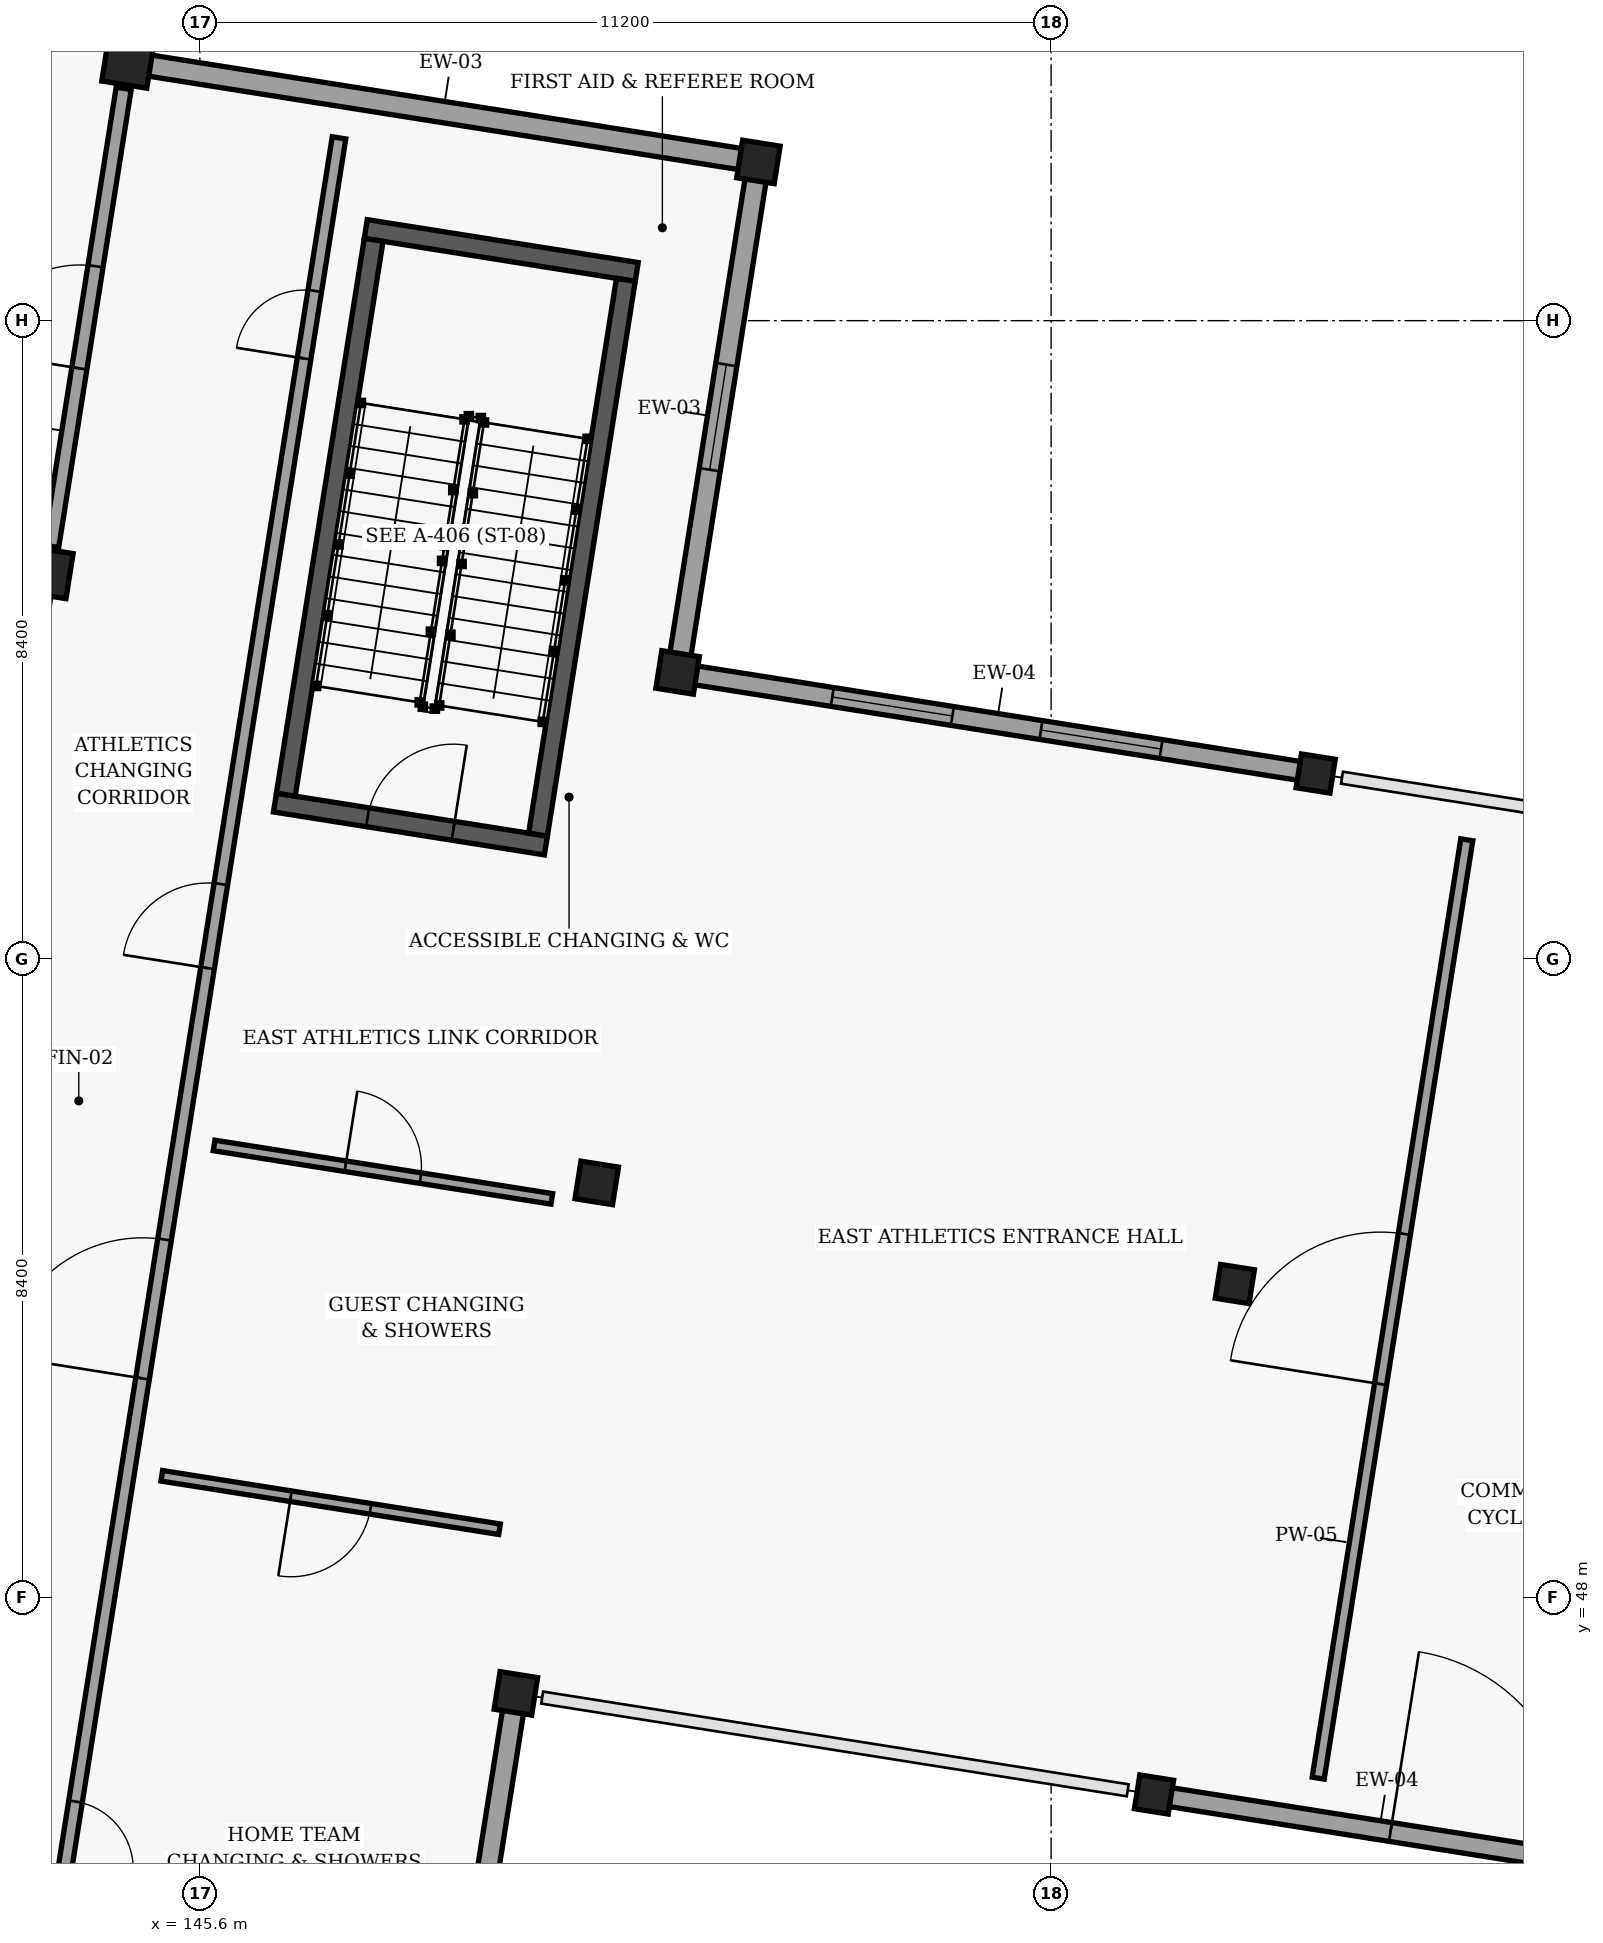
"""IFC4 building model, lengths in metres.
Left out: names, types, materials, properties, quantities, classifications, styles, units other than length and angle.
Written with IfcOpenShell. Run it as: python <this file> out.ifc"""

import sys

from ifc_helpers import new_model, si_unit, direction, frame, frame_2d, origin, origin_2d, place, context, subcontext, project, spatial, rectangle, circle, extrude, element, fill, save


model = new_model("IFC4")
c1 = context("Model", 3, precision=1e-05, world=origin(), true_north=direction((0.0, 1.0)))
c2 = subcontext(c1, "Body", "Model", "MODEL_VIEW")
j1 = project(units=[si_unit("LENGTHUNIT", "METRE"), si_unit("PLANEANGLEUNIT", "RADIAN")], contexts=[c1])
p1 = place(None, origin())
s1 = spatial("IfcSite", under=j1, at=p1, CompositionType="ELEMENT")
p2 = place(p1, origin())
s2 = spatial("IfcBuilding", under=s1, at=p2, CompositionType="ELEMENT")
p3 = place(p2, origin())
s3 = spatial("IfcBuildingStorey", under=s2, at=p3, CompositionType="ELEMENT", Elevation=0.0)
for number, where, z_axis, x_axis in (
    (1, (143.589, 61.486, 0.0), (0.0, 0.0, 1.0), (0.988, -0.156, 0.0)),
    (2, (144.653, 68.202, 0.0), (0.0, 0.0, 1.0), (0.988, -0.156, 0.0)),
):
    element("IfcColumn", number, at=place(p3, frame(where, z_axis=z_axis, x_axis=x_axis)), inside=s3, PredefinedType="COLUMN", context=c2, shape_type="SweptSolid", body=[
        extrude(rectangle(XDim=0.6, YDim=0.6, at=origin_2d()), origin(), (0.0, 0.0, 1.0), 4.8),
    ])
for number, where, z_axis, x_axis in (
    (3, (149.758, 46.74, 0.0), (0.0, 0.0, 1.0), (0.988, -0.156, 0.0)),
    (4, (150.822, 53.456, 0.0), (0.0, 0.0, 1.0), (0.988, -0.156, 0.0)),
    (5, (151.886, 60.172, 0.0), (0.0, 0.0, 1.0), (0.988, -0.156, 0.0)),
    (6, (152.949, 66.888, 0.0), (0.0, 0.0, 1.0), (0.988, -0.156, 0.0)),
):
    element("IfcColumn", number, at=place(p3, frame(where, z_axis=z_axis, x_axis=x_axis)), inside=s3, PredefinedType="COLUMN", context=c2, shape_type="SweptSolid", body=[
        extrude(rectangle(XDim=0.5, YDim=0.5, at=origin_2d()), origin(), (0.0, 0.0, 1.0), 4.8),
    ])
for number, where, z_axis, x_axis in (
    (7, (158.154, 45.41, 0.0), (0.0, 0.0, 1.0), (0.988, -0.156, 0.0)),
    (8, (159.217, 52.126, 0.0), (0.0, 0.0, 1.0), (0.988, -0.156, 0.0)),
    (9, (160.281, 58.842, 0.0), (0.0, 0.0, 1.0), (0.988, -0.156, 0.0)),
):
    element("IfcColumn", number, at=place(p3, frame(where, z_axis=z_axis, x_axis=x_axis)), inside=s3, PredefinedType="PILASTER", context=c2, shape_type="SweptSolid", body=[
        extrude(circle(Radius=0.225, at=origin_2d()), origin(), (0.0, 0.0, 1.0), 4.8),
    ])
p4 = place(p3, frame((148.71, 40.122, 0.0), z_axis=(0.0, 0.0, 1.0), x_axis=(0.156500089252, 0.987677944506, 0.0)))
e10 = element("IfcWall", 10, at=p4, inside=s3, PredefinedType="SOLIDWALL", context=c2, shape_type="SweptSolid", body=[
    extrude(rectangle(XDim=6.6, YDim=0.28, at=frame_2d((3.3, 0.0))), origin(), (0.0, 0.0, 1.0), 3.928),
])
p5 = place(p4, frame((2.6, 0.0, 1.35)))
e11 = element("IfcOpeningElement", 11, at=p5, cuts=e10, PredefinedType="OPENING", context=c2, shape_type="SweptSolid", body=[
    extrude(rectangle(XDim=1.4, YDim=1.2, at=frame_2d((0.7, 0.6))), frame((0.0, 0.15, 0.0), z_axis=(0.0, -1.0, 0.0), x_axis=(1.0, 0.0, 0.0)), (0.0, 0.0, 1.0), 0.3),
])
p6 = place(p3, frame((151.901, 60.271, 0.0), z_axis=(0.0, 0.0, 1.0), x_axis=(0.156536171909, 0.987672226442, 0.0)))
e12 = element("IfcWall", 12, at=p6, inside=s3, PredefinedType="SOLIDWALL", context=c2, shape_type="SweptSolid", body=[
    extrude(rectangle(XDim=6.6, YDim=0.28, at=frame_2d((3.3, 0.0))), origin(), (0.0, 0.0, 1.0), 3.928),
])
p7 = place(p6, frame((2.6, 0.0, 1.35)))
e13 = element("IfcOpeningElement", 13, at=p7, cuts=e12, PredefinedType="OPENING", context=c2, shape_type="SweptSolid", body=[
    extrude(rectangle(XDim=1.4, YDim=1.2, at=frame_2d((0.7, 0.6))), frame((0.0, 0.15, 0.0), z_axis=(0.0, -1.0, 0.0), x_axis=(1.0, 0.0, 0.0)), (0.0, 0.0, 1.0), 0.3),
])
p8 = place(p3, frame((144.732, 68.189, 0.0), z_axis=(0.0, 0.0, 1.0), x_axis=(0.987704756752, -0.156330782283, 0.0)))
e14 = element("IfcWall", 14, at=p8, inside=s3, PredefinedType="SOLIDWALL", context=c2, shape_type="SweptSolid", body=[
    extrude(rectangle(XDim=8.24, YDim=0.28, at=frame_2d((4.12, 0.0))), origin(), (0.0, 0.0, 1.0), 4.006),
])
p9 = place(p3, frame((144.666, 68.281, 0.0), z_axis=(0.0, 0.0, 1.0), x_axis=(0.15632126228, 0.987706263501, 0.0)))
e15 = element("IfcWall", 15, at=p9, inside=s3, PredefinedType="SOLIDWALL", context=c2, shape_type="SweptSolid", body=[
    extrude(rectangle(XDim=6.641, YDim=0.28, at=frame_2d((3.32, 0.0))), origin(), (0.0, 0.0, 1.0), 4.135),
])
p10 = place(p3, frame((158.233, 45.397, 0.0), z_axis=(0.0, 0.0, 1.0), x_axis=(0.987701196417, -0.156353274977, 0.0)))
e16 = element("IfcWall", 16, at=p10, inside=s3, PredefinedType="SOLIDWALL", context=c2, shape_type="SweptSolid", body=[
    extrude(rectangle(XDim=5.84, YDim=0.25, at=frame_2d((2.92, 0.0))), origin(), (0.0, 0.0, 1.0), 4.375),
])
p11 = place(p10, frame((3.07, 0.0, 0.0)))
e17 = element("IfcOpeningElement", 17, at=p11, cuts=e16, PredefinedType="OPENING", context=c2, shape_type="SweptSolid", body=[
    extrude(rectangle(XDim=2.4, YDim=2.4, at=frame_2d((1.2, 1.2))), frame((0.0, 0.135, 0.0), z_axis=(0.0, -1.0, 0.0), x_axis=(1.0, 0.0, 0.0)), (0.0, 0.0, 1.0), 0.27),
])
p12 = place(p3, frame((151.965, 60.159, 0.0), z_axis=(0.0, 0.0, 1.0), x_axis=(0.987699982026, -0.156360946233, 0.0)))
e18 = element("IfcWall", 18, at=p12, inside=s3, PredefinedType="SOLIDWALL", context=c2, shape_type="SweptSolid", body=[
    extrude(rectangle(XDim=8.339, YDim=0.25, at=frame_2d((4.17, 0.0))), origin(), (0.0, 0.0, 1.0), 4.375),
])
p13 = place(p12, frame((1.98, 0.0, 0.9)))
e19 = element("IfcOpeningElement", 19, at=p13, cuts=e18, PredefinedType="OPENING", context=c2, shape_type="SweptSolid", body=[
    extrude(rectangle(XDim=1.6, YDim=2.1, at=frame_2d((0.8, 1.05))), frame((0.0, 0.135, 0.0), z_axis=(0.0, -1.0, 0.0), x_axis=(1.0, 0.0, 0.0)), (0.0, 0.0, 1.0), 0.27),
])
p14 = place(p12, frame((4.76, 0.0, 0.9)))
e20 = element("IfcOpeningElement", 20, at=p14, cuts=e18, PredefinedType="OPENING", context=c2, shape_type="SweptSolid", body=[
    extrude(rectangle(XDim=1.6, YDim=2.1, at=frame_2d((0.8, 1.05))), frame((0.0, 0.135, 0.0), z_axis=(0.0, -1.0, 0.0), x_axis=(1.0, 0.0, 0.0)), (0.0, 0.0, 1.0), 0.27),
])
p15 = place(p3, frame((150.153, 57.895, 0.0), z_axis=(0.0, 0.0, 1.0), x_axis=(-0.987676717047, 0.156507835599, 0.0)))
e21 = element("IfcWall", 21, at=p15, inside=s3, PredefinedType="SHEAR", context=c2, shape_type="SweptSolid", body=[
    extrude(rectangle(XDim=3.61, YDim=0.25, at=frame_2d((1.805, 0.0))), origin(), (0.0, 0.0, 1.0), 4.56),
])
p16 = place(p15, frame((1.235, 0.0, 0.0)))
e22 = element("IfcOpeningElement", 22, at=p16, cuts=e21, PredefinedType="OPENING", context=c2, shape_type="SweptSolid", body=[
    extrude(rectangle(XDim=1.14, YDim=2.15, at=frame_2d((0.57, 1.075))), frame((0.0, 0.135, 0.0), z_axis=(0.0, -1.0, 0.0), x_axis=(1.0, 0.0, 0.0)), (0.0, 0.0, 1.0), 0.27),
])
p17 = place(p3, frame((147.783, 66.006, 0.0), z_axis=(0.0, 0.0, 1.0), x_axis=(0.987664601714, -0.156584272906, 0.0)))
e23 = element("IfcWall", 23, at=p17, inside=s3, PredefinedType="SHEAR", context=c2, shape_type="SweptSolid", body=[
    extrude(rectangle(XDim=3.609, YDim=0.25, at=frame_2d((1.805, 0.0))), origin(), (0.0, 0.0, 1.0), 4.56),
])
p18 = place(p3, frame((146.731, 58.564, 0.0), z_axis=(0.0, 0.0, 1.0), x_axis=(0.15642738738, 0.98768946156, 0.0)))
e24 = element("IfcWall", 24, at=p18, inside=s3, PredefinedType="SHEAR", context=c2, shape_type="SweptSolid", body=[
    extrude(rectangle(XDim=7.39, YDim=0.25, at=frame_2d((3.695, 0.0))), origin(), (0.0, 0.0, 1.0), 4.56),
])
p19 = place(p3, frame((151.205, 65.337, 0.0), z_axis=(0.0, 0.0, 1.0), x_axis=(-0.156432491725, -0.987688653136, 0.0)))
e25 = element("IfcWall", 25, at=p19, inside=s3, PredefinedType="SHEAR", context=c2, shape_type="SweptSolid", body=[
    extrude(rectangle(XDim=7.39, YDim=0.25, at=frame_2d((3.695, 0.0))), origin(), (0.0, 0.0, 1.0), 4.56),
])
p20 = place(p3, frame((143.644, 61.832, 0.0), z_axis=(0.0, 0.0, 1.0), x_axis=(0.156396286335, 0.987694386752, 0.0)))
e26 = element("IfcWall", 26, at=p20, inside=s3, PredefinedType="PARTITIONING", context=c2, shape_type="SweptSolid", body=[
    extrude(rectangle(XDim=6.099, YDim=0.2, at=frame_2d((3.049, 0.0))), origin(), (0.0, 0.0, 1.0), 3.928),
])
p21 = place(p20, frame((2.37, 0.0, 0.0)))
e27 = element("IfcOpeningElement", 27, at=p21, cuts=e26, PredefinedType="OPENING", context=c2, shape_type="SweptSolid", body=[
    extrude(rectangle(XDim=1.36, YDim=2.22, at=frame_2d((0.68, 1.11))), frame((0.0, 0.11, 0.0), z_axis=(0.0, -1.0, 0.0), x_axis=(1.0, 0.0, 0.0)), (0.0, 0.0, 1.0), 0.22),
])
p22 = place(p3, frame((160.314, 45.625, 0.0), z_axis=(0.0, 0.0, 1.0), x_axis=(0.156420950688, 0.987690480963, 0.0)))
e28 = element("IfcWall", 28, at=p22, inside=s3, PredefinedType="PARTITIONING", context=c2, shape_type="SweptSolid", body=[
    extrude(rectangle(XDim=12.499, YDim=0.16, at=frame_2d((6.25, 0.0))), origin(), (0.0, 0.0, 1.0), 4.545),
])
p23 = place(p22, frame((5.249, 0.0, 0.0)))
e29 = element("IfcOpeningElement", 29, at=p23, cuts=e28, PredefinedType="OPENING", context=c2, shape_type="SweptSolid", body=[
    extrude(rectangle(XDim=2.0, YDim=2.3, at=frame_2d((1.0, 1.15))), frame((0.0, 0.09, 0.0), z_axis=(0.0, -1.0, 0.0), x_axis=(1.0, 0.0, 0.0)), (0.0, 0.0, 1.0), 0.18),
])
p24 = place(p3, frame((143.348, 41.427, 0.0), z_axis=(0.0, 0.0, 1.0), x_axis=(0.156440506918, 0.987687383637, 0.0)))
e30 = element("IfcWall", 30, at=p24, inside=s3, PredefinedType="PARTITIONING", context=c2, shape_type="SweptSolid", body=[
    extrude(rectangle(XDim=26.099, YDim=0.18, at=frame_2d((13.05, 0.0))), origin(), (0.0, 0.0, 1.0), 4.006),
])
p25 = place(p24, frame((9.575, 0.0, 0.0)))
e31 = element("IfcOpeningElement", 31, at=p25, cuts=e30, PredefinedType="OPENING", context=c2, shape_type="SweptSolid", body=[
    extrude(rectangle(XDim=1.85, YDim=2.22, at=frame_2d((0.925, 1.11))), frame((0.0, 0.1, 0.0), z_axis=(0.0, -1.0, 0.0), x_axis=(1.0, 0.0, 0.0)), (0.0, 0.0, 1.0), 0.2),
])
p26 = place(p24, frame((15.04, 0.0, 0.0)))
e32 = element("IfcOpeningElement", 32, at=p26, cuts=e30, PredefinedType="OPENING", context=c2, shape_type="SweptSolid", body=[
    extrude(rectangle(XDim=1.12, YDim=2.16, at=frame_2d((0.56, 1.08))), frame((0.0, 0.1, 0.0), z_axis=(0.0, -1.0, 0.0), x_axis=(1.0, 0.0, 0.0)), (0.0, 0.0, 1.0), 0.2),
])
p27 = place(p24, frame((3.039, 0.0, 0.0)))
e33 = element("IfcOpeningElement", 33, at=p27, cuts=e30, PredefinedType="OPENING", context=c2, shape_type="SweptSolid", body=[
    extrude(rectangle(XDim=0.9, YDim=2.06, at=frame_2d((0.45, 1.03))), frame((0.0, 0.1, 0.0), z_axis=(0.0, -1.0, 0.0), x_axis=(1.0, 0.0, 0.0)), (0.0, 0.0, 1.0), 0.2),
])
p28 = place(p24, frame((23.161, 0.0, 0.0)))
e34 = element("IfcOpeningElement", 34, at=p28, cuts=e30, PredefinedType="OPENING", context=c2, shape_type="SweptSolid", body=[
    extrude(rectangle(XDim=0.9, YDim=2.06, at=frame_2d((0.45, 1.03))), frame((0.0, 0.1, 0.0), z_axis=(0.0, -1.0, 0.0), x_axis=(1.0, 0.0, 0.0)), (0.0, 0.0, 1.0), 0.2),
])
p29 = place(p3, frame((145.099, 49.603, 0.0), z_axis=(0.0, 0.0, 1.0), x_axis=(0.987712756743, -0.156280229613, 0.0)))
e35 = element("IfcWall", 35, at=p29, inside=s3, PredefinedType="PARTITIONING", context=c2, shape_type="SweptSolid", body=[
    extrude(rectangle(XDim=4.499, YDim=0.14, at=frame_2d((2.25, 0.0))), origin(), (0.0, 0.0, 1.0), 4.135),
])
p30 = place(p29, frame((1.72, 0.0, 0.0)))
e36 = element("IfcOpeningElement", 36, at=p30, cuts=e35, PredefinedType="OPENING", context=c2, shape_type="SweptSolid", body=[
    extrude(rectangle(XDim=1.06, YDim=2.16, at=frame_2d((0.53, 1.08))), frame((0.0, 0.08, 0.0), z_axis=(0.0, -1.0, 0.0), x_axis=(1.0, 0.0, 0.0)), (0.0, 0.0, 1.0), 0.16),
])
p31 = place(p3, frame((145.787, 53.949, 0.0), z_axis=(0.0, 0.0, 1.0), x_axis=(0.98772113158, -0.156227290288, 0.0)))
e37 = element("IfcWall", 37, at=p31, inside=s3, PredefinedType="PARTITIONING", context=c2, shape_type="SweptSolid", body=[
    extrude(rectangle(XDim=4.499, YDim=0.14, at=frame_2d((2.25, 0.0))), origin(), (0.0, 0.0, 1.0), 4.135),
])
p32 = place(p31, frame((1.75, 0.0, 0.0)))
e38 = element("IfcOpeningElement", 38, at=p32, cuts=e37, PredefinedType="OPENING", context=c2, shape_type="SweptSolid", body=[
    extrude(rectangle(XDim=1.0, YDim=2.14, at=frame_2d((0.5, 1.07))), frame((0.0, 0.08, 0.0), z_axis=(0.0, -1.0, 0.0), x_axis=(1.0, 0.0, 0.0)), (0.0, 0.0, 1.0), 0.16),
])
p33 = place(p7, origin())
e39 = element("IfcWindow", 39, at=p33, inside=s3, PartitioningType="SINGLE_PANEL", PredefinedType="WINDOW", context=c2, shape_type="SweptSolid", body=[
    extrude(rectangle(XDim=1.4, YDim=1.2, at=frame_2d((0.7, 0.6))), frame((0.0, 0.03, 0.0), z_axis=(0.0, -1.0, 0.0), x_axis=(1.0, 0.0, 0.0)), (0.0, 0.0, 1.0), 0.06),
])
fill(e13, e39)
p34 = place(p13, origin())
e40 = element("IfcWindow", 40, at=p34, inside=s3, PartitioningType="SINGLE_PANEL", PredefinedType="WINDOW", context=c2, shape_type="SweptSolid", body=[
    extrude(rectangle(XDim=1.6, YDim=2.1, at=frame_2d((0.8, 1.05))), frame((0.0, 0.03, 0.0), z_axis=(0.0, -1.0, 0.0), x_axis=(1.0, 0.0, 0.0)), (0.0, 0.0, 1.0), 0.06),
])
fill(e19, e40)
p35 = place(p14, origin())
e41 = element("IfcWindow", 41, at=p35, inside=s3, PartitioningType="SINGLE_PANEL", PredefinedType="WINDOW", context=c2, shape_type="SweptSolid", body=[
    extrude(rectangle(XDim=1.6, YDim=2.1, at=frame_2d((0.8, 1.05))), frame((0.0, 0.03, 0.0), z_axis=(0.0, -1.0, 0.0), x_axis=(1.0, 0.0, 0.0)), (0.0, 0.0, 1.0), 0.06),
])
fill(e20, e41)
p36 = place(p16, origin())
e42 = element("IfcDoor", 42, at=p36, inside=s3, OperationType="SINGLE_SWING_RIGHT", PredefinedType="DOOR", context=c2, shape_type="SweptSolid", body=[
    extrude(rectangle(XDim=1.14, YDim=2.15, at=frame_2d((0.57, 1.075))), frame((0.0, 0.025, 0.0), z_axis=(0.0, -1.0, 0.0), x_axis=(1.0, 0.0, 0.0)), (0.0, 0.0, 1.0), 0.05),
])
fill(e22, e42)
p37 = place(p11, origin())
e43 = element("IfcDoor", 43, at=p37, inside=s3, OperationType="DOUBLE_DOOR_SINGLE_SWING", PredefinedType="DOOR", context=c2, shape_type="SweptSolid", body=[
    extrude(rectangle(XDim=2.4, YDim=2.4, at=frame_2d((1.2, 1.2))), frame((0.0, 0.025, 0.0), z_axis=(0.0, -1.0, 0.0), x_axis=(1.0, 0.0, 0.0)), (0.0, 0.0, 1.0), 0.05),
])
fill(e17, e43)
p38 = place(p21, origin())
e44 = element("IfcDoor", 44, at=p38, inside=s3, OperationType="DOUBLE_DOOR_SINGLE_SWING", PredefinedType="DOOR", context=c2, shape_type="SweptSolid", body=[
    extrude(rectangle(XDim=1.36, YDim=2.22, at=frame_2d((0.68, 1.11))), frame((0.0, 0.025, 0.0), z_axis=(0.0, -1.0, 0.0), x_axis=(1.0, 0.0, 0.0)), (0.0, 0.0, 1.0), 0.05),
])
fill(e27, e44)
p39 = place(p23, origin())
e45 = element("IfcDoor", 45, at=p39, inside=s3, OperationType="DOUBLE_DOOR_SINGLE_SWING", PredefinedType="DOOR", context=c2, shape_type="SweptSolid", body=[
    extrude(rectangle(XDim=2.0, YDim=2.3, at=frame_2d((1.0, 1.15))), frame((0.0, 0.025, 0.0), z_axis=(0.0, -1.0, 0.0), x_axis=(1.0, 0.0, 0.0)), (0.0, 0.0, 1.0), 0.05),
])
fill(e29, e45)
p40 = place(p25, origin())
e46 = element("IfcDoor", 46, at=p40, inside=s3, OperationType="DOUBLE_DOOR_SINGLE_SWING", PredefinedType="DOOR", context=c2, shape_type="SweptSolid", body=[
    extrude(rectangle(XDim=1.85, YDim=2.22, at=frame_2d((0.925, 1.11))), frame((0.0, 0.025, 0.0), z_axis=(0.0, -1.0, 0.0), x_axis=(1.0, 0.0, 0.0)), (0.0, 0.0, 1.0), 0.05),
])
fill(e31, e46)
p41 = place(p26, origin())
e47 = element("IfcDoor", 47, at=p41, inside=s3, OperationType="SINGLE_SWING_LEFT", PredefinedType="DOOR", context=c2, shape_type="SweptSolid", body=[
    extrude(rectangle(XDim=1.12, YDim=2.16, at=frame_2d((0.56, 1.08))), frame((0.0, 0.025, 0.0), z_axis=(0.0, -1.0, 0.0), x_axis=(1.0, 0.0, 0.0)), (0.0, 0.0, 1.0), 0.05),
])
fill(e32, e47)
p42 = place(p30, origin())
e48 = element("IfcDoor", 48, at=p42, inside=s3, OperationType="SINGLE_SWING_RIGHT", PredefinedType="DOOR", context=c2, shape_type="SweptSolid", body=[
    extrude(rectangle(XDim=1.06, YDim=2.16, at=frame_2d((0.53, 1.08))), frame((0.0, 0.025, 0.0), z_axis=(0.0, -1.0, 0.0), x_axis=(1.0, 0.0, 0.0)), (0.0, 0.0, 1.0), 0.05),
])
fill(e36, e48)
p43 = place(p32, origin())
e49 = element("IfcDoor", 49, at=p43, inside=s3, OperationType="SINGLE_SWING_LEFT", PredefinedType="DOOR", context=c2, shape_type="SweptSolid", body=[
    extrude(rectangle(XDim=1.0, YDim=2.14, at=frame_2d((0.5, 1.07))), frame((0.0, 0.025, 0.0), z_axis=(0.0, -1.0, 0.0), x_axis=(1.0, 0.0, 0.0)), (0.0, 0.0, 1.0), 0.05),
])
fill(e38, e49)
p44 = place(p27, origin())
e50 = element("IfcDoor", 50, at=p44, inside=s3, OperationType="SINGLE_SWING_RIGHT", PredefinedType="DOOR", context=c2, shape_type="SweptSolid", body=[
    extrude(rectangle(XDim=0.9, YDim=2.06, at=frame_2d((0.45, 1.03))), frame((0.0, 0.025, 0.0), z_axis=(0.0, -1.0, 0.0), x_axis=(1.0, 0.0, 0.0)), (0.0, 0.0, 1.0), 0.05),
])
fill(e33, e50)
p45 = place(p28, origin())
e51 = element("IfcDoor", 51, at=p45, inside=s3, OperationType="SINGLE_SWING_LEFT", PredefinedType="DOOR", context=c2, shape_type="SweptSolid", body=[
    extrude(rectangle(XDim=0.9, YDim=2.06, at=frame_2d((0.45, 1.03))), frame((0.0, 0.025, 0.0), z_axis=(0.0, -1.0, 0.0), x_axis=(1.0, 0.0, 0.0)), (0.0, 0.0, 1.0), 0.05),
])
fill(e34, e51)
save(model, sys.argv[1])
